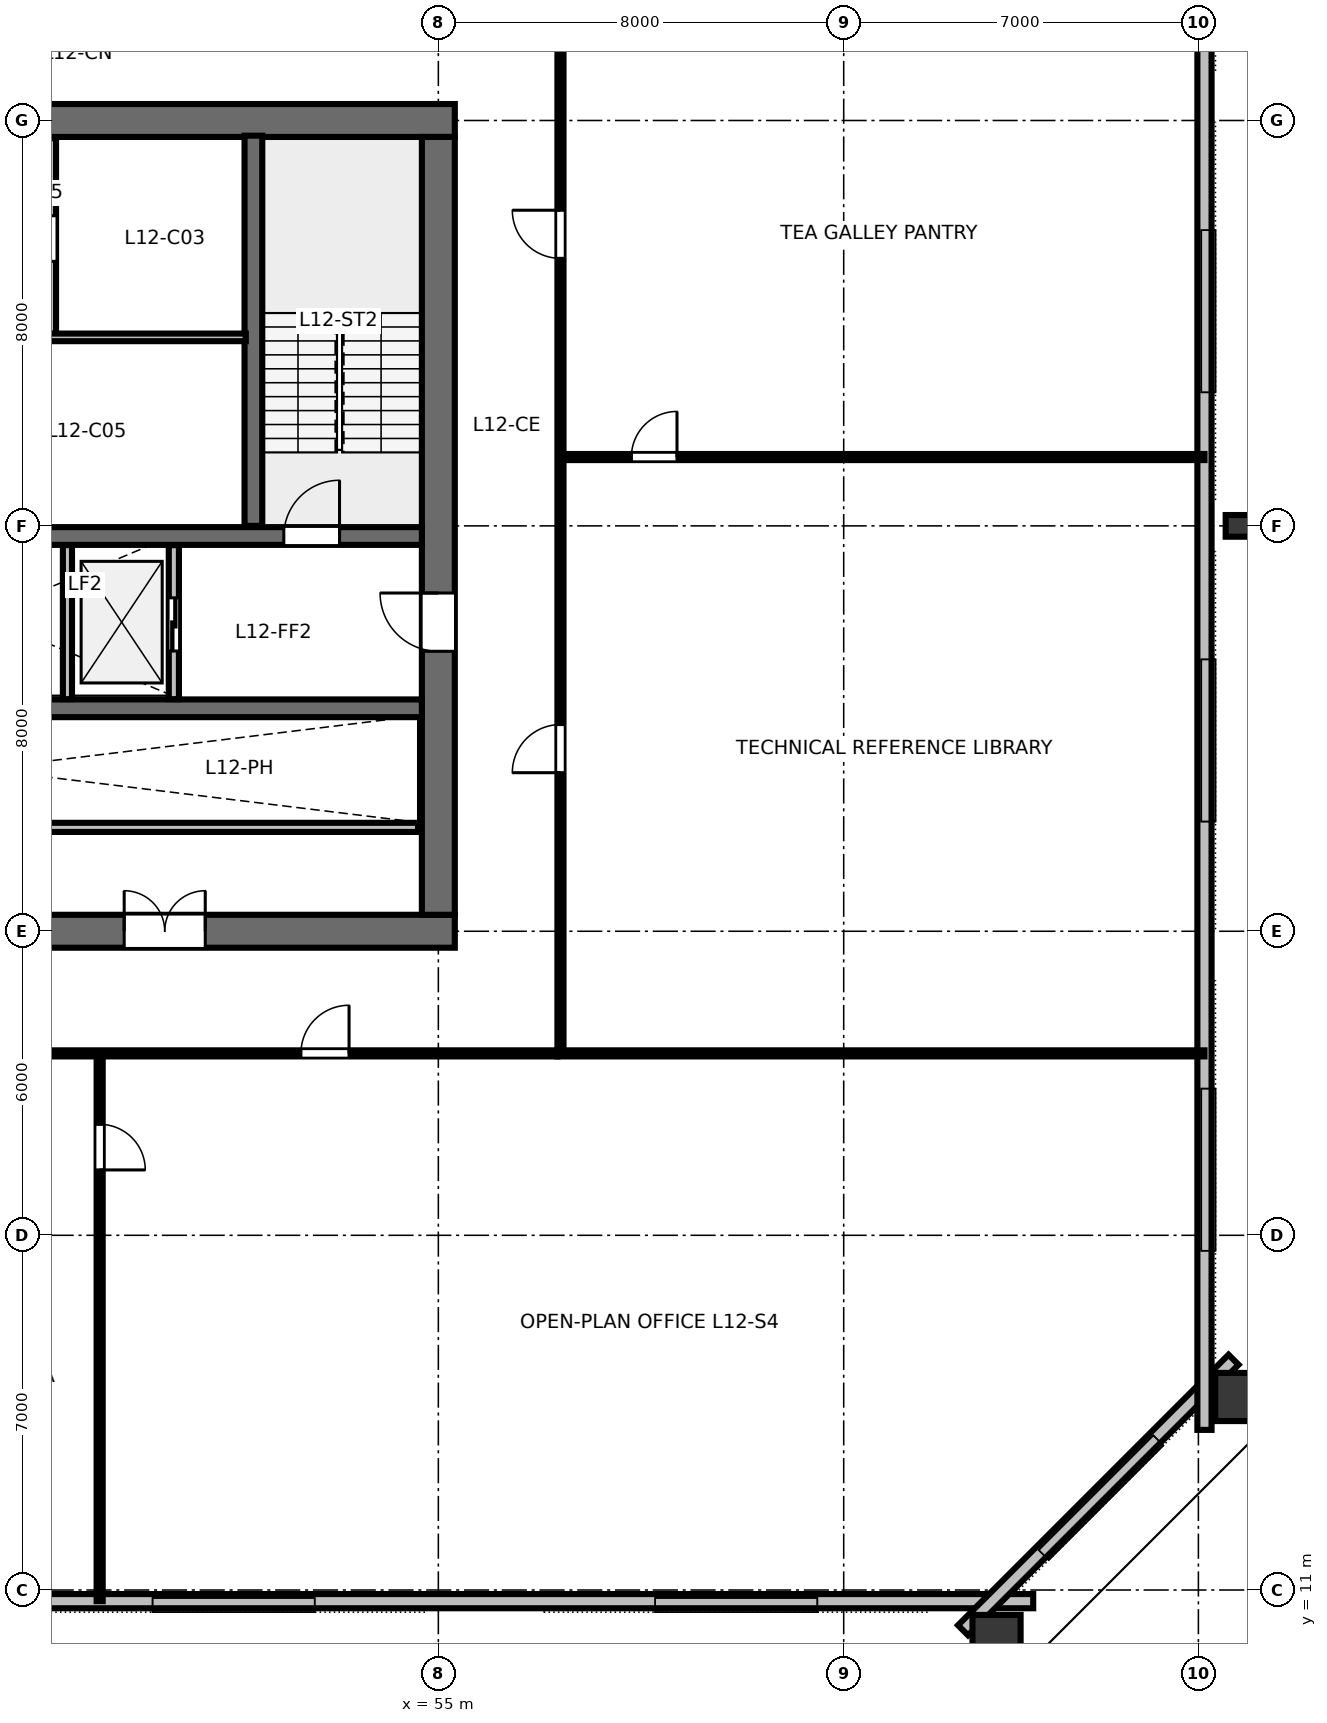
"""IFC4 building model, lengths in metres.
Left out: names, types, materials, properties, quantities, classifications, styles, units other than length and angle.
Written with IfcOpenShell. Run it as: python <this file> out.ifc"""

import sys

from ifc_helpers import new_model, si_unit, direction, frame, frame_2d, origin, origin_2d, place, context, subcontext, project, spatial, rectangle, hollow_rectangle, i_section, extrude, element, fill, save


model = new_model("IFC4")
c1 = context("Model", 3, precision=1e-05, world=origin(), true_north=direction((0.0, 1.0)))
c2 = subcontext(c1, "Body", "Model", "MODEL_VIEW")
j1 = project(units=[si_unit("LENGTHUNIT", "METRE"), si_unit("PLANEANGLEUNIT", "RADIAN")], contexts=[c1])
p1 = place(None, origin())
s1 = spatial("IfcSite", under=j1, at=p1, CompositionType="ELEMENT")
p2 = place(p1, origin())
s2 = spatial("IfcBuilding", under=s1, at=p2, CompositionType="ELEMENT")
p3 = place(p2, frame((0.0, 0.0, 49.6)))
s3 = spatial("IfcBuildingStorey", under=s2, at=p3, CompositionType="ELEMENT", Elevation=49.6)
p4 = place(p3, frame((36.675, 24.0, 0.0), z_axis=(0.0, 0.0, 1.0), x_axis=(1.0, 0.0, 0.0)))
e1 = element("IfcWall", 1, at=p4, inside=s3, PredefinedType="SHEAR", context=c2, shape_type="SweptSolid", body=[
    extrude(rectangle(XDim=18.65, YDim=0.65, at=frame_2d((9.325, 0.0))), origin(), (0.0, 0.0, 1.0), 3.36),
])
p5 = place(p4, frame((5.725, 0.0, 0.0)))
e2 = element("IfcOpeningElement", 2, at=p5, cuts=e1, PredefinedType="OPENING", context=c2, shape_type="SweptSolid", body=[
    extrude(rectangle(XDim=1.6, YDim=2.15, at=frame_2d((0.8, 1.075))), frame((0.0, 0.335, 0.0), z_axis=(0.0, -1.0, 0.0), x_axis=(1.0, 0.0, 0.0)), (0.0, 0.0, 1.0), 0.67),
])
p6 = place(p4, frame((12.125, 0.0, 0.0)))
e3 = element("IfcOpeningElement", 3, at=p6, cuts=e1, PredefinedType="OPENING", context=c2, shape_type="SweptSolid", body=[
    extrude(rectangle(XDim=1.6, YDim=2.15, at=frame_2d((0.8, 1.075))), frame((0.0, 0.335, 0.0), z_axis=(0.0, -1.0, 0.0), x_axis=(1.0, 0.0, 0.0)), (0.0, 0.0, 1.0), 0.67),
])
p7 = place(p3, frame((36.675, 40.0, 0.0), z_axis=(0.0, 0.0, 1.0), x_axis=(1.0, 0.0, 0.0)))
e4 = element("IfcWall", 4, at=p7, inside=s3, PredefinedType="SHEAR", context=c2, shape_type="SweptSolid", body=[
    extrude(rectangle(XDim=18.65, YDim=0.65, at=frame_2d((9.325, 0.0))), origin(), (0.0, 0.0, 1.0), 3.36),
])
p8 = place(p7, frame((8.825, 0.0, 0.0)))
e5 = element("IfcOpeningElement", 5, at=p8, cuts=e4, PredefinedType="OPENING", context=c2, shape_type="SweptSolid", body=[
    extrude(rectangle(XDim=1.0, YDim=2.15, at=frame_2d((0.5, 1.075))), frame((0.0, 0.335, 0.0), z_axis=(0.0, -1.0, 0.0), x_axis=(1.0, 0.0, 0.0)), (0.0, 0.0, 1.0), 0.67),
])
p9 = place(p3, frame((55.0, 24.325, 0.0), z_axis=(0.0, 0.0, 1.0), x_axis=(0.0, 1.0, 0.0)))
e6 = element("IfcWall", 6, at=p9, inside=s3, PredefinedType="SHEAR", context=c2, shape_type="SweptSolid", body=[
    extrude(rectangle(XDim=15.35, YDim=0.65, at=frame_2d((7.675, 0.0))), origin(), (0.0, 0.0, 1.0), 3.36),
])
p10 = place(p9, frame((5.2, 0.0, 0.0)))
e7 = element("IfcOpeningElement", 7, at=p10, cuts=e6, PredefinedType="OPENING", context=c2, shape_type="SweptSolid", body=[
    extrude(rectangle(XDim=1.15, YDim=2.15, at=frame_2d((0.575, 1.075))), frame((0.0, 0.335, 0.0), z_axis=(0.0, -1.0, 0.0), x_axis=(1.0, 0.0, 0.0)), (0.0, 0.0, 1.0), 0.67),
])
p11 = place(p3, frame((37.325, 31.8, 0.0), z_axis=(0.0, 0.0, 1.0), x_axis=(1.0, 0.0, 0.0)))
e8 = element("IfcWall", 8, at=p11, inside=s3, PredefinedType="SHEAR", context=c2, shape_type="SweptSolid", body=[
    extrude(rectangle(XDim=17.35, YDim=0.35, at=frame_2d((8.675, 0.0))), origin(), (0.0, 0.0, 1.0), 3.36),
])
p12 = place(p11, frame((0.725, 0.0, 0.0)))
e9 = element("IfcOpeningElement", 9, at=p12, cuts=e8, PredefinedType="OPENING", context=c2, shape_type="SweptSolid", body=[
    extrude(rectangle(XDim=1.1, YDim=2.15, at=frame_2d((0.55, 1.075))), frame((0.0, 0.185, 0.0), z_axis=(0.0, -1.0, 0.0), x_axis=(1.0, 0.0, 0.0)), (0.0, 0.0, 1.0), 0.37),
])
p13 = place(p11, frame((14.625, 0.0, 0.0)))
e10 = element("IfcOpeningElement", 10, at=p13, cuts=e8, PredefinedType="OPENING", context=c2, shape_type="SweptSolid", body=[
    extrude(rectangle(XDim=1.1, YDim=2.15, at=frame_2d((0.55, 1.075))), frame((0.0, 0.185, 0.0), z_axis=(0.0, -1.0, 0.0), x_axis=(1.0, 0.0, 0.0)), (0.0, 0.0, 1.0), 0.37),
])
p14 = place(p3, frame((37.325, 28.4, 0.0), z_axis=(0.0, 0.0, 1.0), x_axis=(1.0, 0.0, 0.0)))
e11 = element("IfcWall", 11, at=p14, inside=s3, PredefinedType="SHEAR", context=c2, shape_type="SweptSolid", body=[
    extrude(rectangle(XDim=17.35, YDim=0.35, at=frame_2d((8.675, 0.0))), origin(), (0.0, 0.0, 1.0), 3.36),
])
for number, where, z_axis, x_axis in (
    (12, (66.016, 9.933, 0.0), (0.0, 0.0, 1.0), (1.0, 0.0, 0.0)),
    (13, (70.907, 14.809, 0.0), (0.0, 0.0, 1.0), (0.0, 1.0, 0.0)),
):
    element("IfcColumn", number, at=place(p3, frame(where, z_axis=z_axis, x_axis=x_axis)), inside=s3, PredefinedType="COLUMN", context=c2, shape_type="SweptSolid", body=[
        extrude(hollow_rectangle(XDim=0.95, YDim=1.15, WallThickness=0.06, at=origin_2d()), origin(), (0.0, 0.0, 1.0), 3.358),
    ])
p15 = place(p3, frame((70.78, 32.0, 0.0), z_axis=(0.0, 0.0, 1.0), x_axis=(0.0, 1.0, 0.0)))
e14 = element("IfcColumn", 14, at=p15, inside=s3, PredefinedType="COLUMN", context=c2, shape_type="SweptSolid", body=[
    extrude(i_section(OverallWidth=0.428, OverallDepth=0.483, WebThickness=0.051, FlangeThickness=0.082, FilletRadius=0.025, at=origin_2d()), origin(), (0.0, 0.0, 1.0), 3.358),
])
p16 = place(p3, frame((25.26, 10.78, 0.0), z_axis=(0.0, 0.0, 1.0), x_axis=(1.0, 0.0, 0.0)))
e15 = element("IfcWall", 15, at=p16, inside=s3, PredefinedType="STANDARD", context=c2, shape_type="SweptSolid", body=[
    extrude(rectangle(XDim=41.48, YDim=0.28, at=frame_2d((20.74, 0.0))), origin(), (0.0, 0.0, 1.0), 3.36),
])
p17 = place(p3, frame((65.354, 10.206, 0.0), z_axis=(0.0, 0.0, 1.0), x_axis=(0.707106781187, 0.707106781187, 0.0)))
e16 = element("IfcWall", 16, at=p17, inside=s3, PredefinedType="STANDARD", context=c2, shape_type="SweptSolid", body=[
    extrude(rectangle(XDim=7.551, YDim=0.28, at=frame_2d((3.775, 0.0))), origin(), (0.0, 0.0, 1.0), 3.36),
])
p18 = place(p3, frame((70.12, 14.16, 0.0), z_axis=(0.0, 0.0, 1.0), x_axis=(0.0, 1.0, 0.0)))
e17 = element("IfcWall", 17, at=p18, inside=s3, PredefinedType="STANDARD", context=c2, shape_type="SweptSolid", body=[
    extrude(rectangle(XDim=35.68, YDim=0.28, at=frame_2d((17.84, 0.0))), origin(), (0.0, 0.0, 1.0), 3.36),
])
p19 = place(p3, frame((51.35, 32.0, 0.0), z_axis=(0.0, 0.0, 1.0), x_axis=(0.0, 1.0, 0.0)))
e18 = element("IfcWall", 18, at=p19, inside=s3, PredefinedType="SHEAR", context=c2, shape_type="SweptSolid", body=[
    extrude(rectangle(XDim=7.7, YDim=0.35, at=frame_2d((3.85, 0.0))), origin(), (0.0, 0.0, 1.0), 3.6),
])
p20 = place(p3, frame((47.38, 35.72, 0.0), z_axis=(0.0, 0.0, 1.0), x_axis=(0.0, 1.0, 0.0)))
e19 = element("IfcWall", 19, at=p20, inside=s3, PredefinedType="PARTITIONING", context=c2, shape_type="SweptSolid", body=[
    extrude(rectangle(XDim=3.93, YDim=0.15, at=frame_2d((1.965, 0.0))), origin(), (0.0, 0.0, 1.0), 3.36),
])
p21 = place(p20, frame((1.5, 0.0, 0.0)))
e20 = element("IfcOpeningElement", 20, at=p21, cuts=e19, PredefinedType="OPENING", context=c2, shape_type="SweptSolid", body=[
    extrude(rectangle(XDim=0.9, YDim=2.15, at=frame_2d((0.45, 1.075))), frame((0.0, 0.085, 0.0), z_axis=(0.0, -1.0, 0.0), x_axis=(1.0, 0.0, 0.0)), (0.0, 0.0, 1.0), 0.17),
])
p22 = place(p3, frame((40.8, 35.72, 0.0), z_axis=(0.0, 0.0, 1.0), x_axis=(1.0, 0.0, 0.0)))
e21 = element("IfcWall", 21, at=p22, inside=s3, PredefinedType="PARTITIONING", context=c2, shape_type="SweptSolid", body=[
    extrude(rectangle(XDim=10.4, YDim=0.15, at=frame_2d((5.2, 0.0))), origin(), (0.0, 0.0, 1.0), 3.36),
])
p23 = place(p22, frame((4.9, 0.0, 0.0)))
e22 = element("IfcOpeningElement", 22, at=p23, cuts=e21, PredefinedType="OPENING", context=c2, shape_type="SweptSolid", body=[
    extrude(rectangle(XDim=0.9, YDim=2.15, at=frame_2d((0.45, 1.075))), frame((0.0, 0.085, 0.0), z_axis=(0.0, -1.0, 0.0), x_axis=(1.0, 0.0, 0.0)), (0.0, 0.0, 1.0), 0.17),
])
p24 = place(p3, frame((49.78, 28.58, 0.0), z_axis=(0.0, 0.0, 1.0), x_axis=(0.0, 1.0, 0.0)))
e23 = element("IfcWall", 23, at=p24, inside=s3, PredefinedType="PARTITIONING", context=c2, shape_type="SweptSolid", body=[
    extrude(rectangle(XDim=3.04, YDim=0.2, at=frame_2d((1.52, 0.0))), origin(), (0.0, 0.0, 1.0), 3.36),
])
p25 = place(p24, frame((0.95, 0.0, 0.0)))
e24 = element("IfcOpeningElement", 24, at=p25, cuts=e23, PredefinedType="OPENING", context=c2, shape_type="SweptSolid", body=[
    extrude(rectangle(XDim=1.05, YDim=2.15, at=frame_2d((0.525, 1.075))), frame((0.0, 0.11, 0.0), z_axis=(0.0, -1.0, 0.0), x_axis=(1.0, 0.0, 0.0)), (0.0, 0.0, 1.0), 0.22),
])
p26 = place(p3, frame((47.68, 28.58, 0.0), z_axis=(0.0, 0.0, 1.0), x_axis=(0.0, 1.0, 0.0)))
e25 = element("IfcWall", 25, at=p26, inside=s3, PredefinedType="PARTITIONING", context=c2, shape_type="SweptSolid", body=[
    extrude(rectangle(XDim=3.04, YDim=0.18, at=frame_2d((1.52, 0.0))), origin(), (0.0, 0.0, 1.0), 3.36),
])
p27 = place(p3, frame((37.4, 26.05, 0.0), z_axis=(0.0, 0.0, 1.0), x_axis=(1.0, 0.0, 0.0)))
e26 = element("IfcWall", 26, at=p27, inside=s3, PredefinedType="PARTITIONING", context=c2, shape_type="SweptSolid", body=[
    extrude(rectangle(XDim=17.2, YDim=0.18, at=frame_2d((8.6, 0.0))), origin(), (0.0, 0.0, 1.0), 3.36),
])
p28 = place(p27, frame((1.1, 0.0, 0.0)))
e27 = element("IfcOpeningElement", 27, at=p28, cuts=e26, PredefinedType="OPENING", context=c2, shape_type="SweptSolid", body=[
    extrude(rectangle(XDim=1.05, YDim=2.15, at=frame_2d((0.525, 1.075))), frame((0.0, 0.1, 0.0), z_axis=(0.0, -1.0, 0.0), x_axis=(1.0, 0.0, 0.0)), (0.0, 0.0, 1.0), 0.2),
])
p29 = place(p27, frame((3.0, 0.0, 0.0)))
e28 = element("IfcOpeningElement", 28, at=p29, cuts=e26, PredefinedType="OPENING", context=c2, shape_type="SweptSolid", body=[
    extrude(rectangle(XDim=1.05, YDim=2.15, at=frame_2d((0.525, 1.075))), frame((0.0, 0.1, 0.0), z_axis=(0.0, -1.0, 0.0), x_axis=(1.0, 0.0, 0.0)), (0.0, 0.0, 1.0), 0.2),
])
p30 = place(p3, frame((48.316, 21.59, 0.0), z_axis=(0.0, 0.0, 1.0), x_axis=(0.0, -1.0, 0.0)))
e29 = element("IfcWall", 29, at=p30, inside=s3, PredefinedType="PARTITIONING", context=c2, shape_type="SweptSolid", body=[
    extrude(rectangle(XDim=10.81, YDim=0.12, at=frame_2d((5.405, 0.0))), origin(), (0.0, 0.0, 1.0), 2.64),
])
p31 = place(p30, frame((1.4, 0.0, 0.0)))
e30 = element("IfcOpeningElement", 30, at=p31, cuts=e29, PredefinedType="OPENING", context=c2, shape_type="SweptSolid", body=[
    extrude(rectangle(XDim=0.9, YDim=2.15, at=frame_2d((0.45, 1.075))), frame((0.0, 0.07, 0.0), z_axis=(0.0, -1.0, 0.0), x_axis=(1.0, 0.0, 0.0)), (0.0, 0.0, 1.0), 0.14),
])
p32 = place(p3, frame((34.65, 21.59, 0.0), z_axis=(0.0, 0.0, 1.0), x_axis=(1.0, 0.0, 0.0)))
e31 = element("IfcWall", 31, at=p32, inside=s3, PredefinedType="PARTITIONING", context=c2, shape_type="SweptSolid", body=[
    extrude(rectangle(XDim=22.7, YDim=0.12, at=frame_2d((11.35, 0.0))), origin(), (0.0, 0.0, 1.0), 2.64),
])
p33 = place(p32, frame((2.045, 0.0, 0.0)))
e32 = element("IfcOpeningElement", 32, at=p33, cuts=e31, PredefinedType="OPENING", context=c2, shape_type="SweptSolid", body=[
    extrude(rectangle(XDim=0.95, YDim=2.15, at=frame_2d((0.475, 1.075))), frame((0.0, 0.07, 0.0), z_axis=(0.0, -1.0, 0.0), x_axis=(1.0, 0.0, 0.0)), (0.0, 0.0, 1.0), 0.14),
])
p34 = place(p32, frame((7.126, 0.0, 0.0)))
e33 = element("IfcOpeningElement", 33, at=p34, cuts=e31, PredefinedType="OPENING", context=c2, shape_type="SweptSolid", body=[
    extrude(rectangle(XDim=0.95, YDim=2.15, at=frame_2d((0.475, 1.075))), frame((0.0, 0.07, 0.0), z_axis=(0.0, -1.0, 0.0), x_axis=(1.0, 0.0, 0.0)), (0.0, 0.0, 1.0), 0.14),
])
p35 = place(p32, frame((11.509, 0.0, 0.0)))
e34 = element("IfcOpeningElement", 34, at=p35, cuts=e31, PredefinedType="OPENING", context=c2, shape_type="SweptSolid", body=[
    extrude(rectangle(XDim=0.95, YDim=2.15, at=frame_2d((0.475, 1.075))), frame((0.0, 0.07, 0.0), z_axis=(0.0, -1.0, 0.0), x_axis=(1.0, 0.0, 0.0)), (0.0, 0.0, 1.0), 0.14),
])
p36 = place(p32, frame((17.638, 0.0, 0.0)))
e35 = element("IfcOpeningElement", 35, at=p36, cuts=e31, PredefinedType="OPENING", context=c2, shape_type="SweptSolid", body=[
    extrude(rectangle(XDim=0.95, YDim=2.15, at=frame_2d((0.475, 1.075))), frame((0.0, 0.07, 0.0), z_axis=(0.0, -1.0, 0.0), x_axis=(1.0, 0.0, 0.0)), (0.0, 0.0, 1.0), 0.14),
])
p37 = place(p3, frame((57.41, 33.358, 0.0), z_axis=(0.0, 0.0, 1.0), x_axis=(1.0, 0.0, 0.0)))
e36 = element("IfcWall", 36, at=p37, inside=s3, PredefinedType="PARTITIONING", context=c2, shape_type="SweptSolid", body=[
    extrude(rectangle(XDim=12.71, YDim=0.12, at=frame_2d((6.355, 0.0))), origin(), (0.0, 0.0, 1.0), 2.64),
])
p38 = place(p37, frame((1.4, 0.0, 0.0)))
e37 = element("IfcOpeningElement", 37, at=p38, cuts=e36, PredefinedType="OPENING", context=c2, shape_type="SweptSolid", body=[
    extrude(rectangle(XDim=0.9, YDim=2.15, at=frame_2d((0.45, 1.075))), frame((0.0, 0.07, 0.0), z_axis=(0.0, -1.0, 0.0), x_axis=(1.0, 0.0, 0.0)), (0.0, 0.0, 1.0), 0.14),
])
p39 = place(p3, frame((57.41, 21.65, 0.0), z_axis=(0.0, 0.0, 1.0), x_axis=(0.0, 1.0, 0.0)))
e38 = element("IfcWall", 38, at=p39, inside=s3, PredefinedType="PARTITIONING", context=c2, shape_type="SweptSolid", body=[
    extrude(rectangle(XDim=20.7, YDim=0.12, at=frame_2d((10.35, 0.0))), origin(), (0.0, 0.0, 1.0), 2.64),
])
p40 = place(p39, frame((5.479, 0.0, 0.0)))
e39 = element("IfcOpeningElement", 39, at=p40, cuts=e38, PredefinedType="OPENING", context=c2, shape_type="SweptSolid", body=[
    extrude(rectangle(XDim=0.95, YDim=2.15, at=frame_2d((0.475, 1.075))), frame((0.0, 0.07, 0.0), z_axis=(0.0, -1.0, 0.0), x_axis=(1.0, 0.0, 0.0)), (0.0, 0.0, 1.0), 0.14),
])
p41 = place(p39, frame((15.629, 0.0, 0.0)))
e40 = element("IfcOpeningElement", 40, at=p41, cuts=e38, PredefinedType="OPENING", context=c2, shape_type="SweptSolid", body=[
    extrude(rectangle(XDim=0.95, YDim=2.15, at=frame_2d((0.475, 1.075))), frame((0.0, 0.07, 0.0), z_axis=(0.0, -1.0, 0.0), x_axis=(1.0, 0.0, 0.0)), (0.0, 0.0, 1.0), 0.14),
])
p42 = place(p3, frame((57.35, 21.59, 0.0), z_axis=(0.0, 0.0, 1.0), x_axis=(1.0, 0.0, 0.0)))
e41 = element("IfcWall", 41, at=p42, inside=s3, PredefinedType="PARTITIONING", context=c2, shape_type="SweptSolid", body=[
    extrude(rectangle(XDim=12.77, YDim=0.12, at=frame_2d((6.385, 0.0))), origin(), (0.0, 0.0, 1.0), 2.64),
])
p43 = place(p13, origin())
e42 = element("IfcDoor", 42, at=p43, inside=s3, OperationType="SINGLE_SWING_RIGHT", PredefinedType="DOOR", context=c2, shape_type="SweptSolid", body=[
    extrude(rectangle(XDim=1.1, YDim=2.15, at=frame_2d((0.55, 1.075))), frame((0.0, 0.025, 0.0), z_axis=(0.0, -1.0, 0.0), x_axis=(1.0, 0.0, 0.0)), (0.0, 0.0, 1.0), 0.05),
])
fill(e10, e42)
p44 = place(p10, origin())
e43 = element("IfcDoor", 43, at=p44, inside=s3, OperationType="SINGLE_SWING_RIGHT", PredefinedType="DOOR", context=c2, shape_type="SweptSolid", body=[
    extrude(rectangle(XDim=1.15, YDim=2.15, at=frame_2d((0.575, 1.075))), frame((0.0, 0.025, 0.0), z_axis=(0.0, -1.0, 0.0), x_axis=(1.0, 0.0, 0.0)), (0.0, 0.0, 1.0), 0.05),
])
fill(e7, e43)
p45 = place(p6, origin())
e44 = element("IfcDoor", 44, at=p45, inside=s3, OperationType="DOUBLE_DOOR_SINGLE_SWING", PredefinedType="DOOR", context=c2, shape_type="SweptSolid", body=[
    extrude(rectangle(XDim=1.6, YDim=2.15, at=frame_2d((0.8, 1.075))), frame((0.0, 0.025, 0.0), z_axis=(0.0, -1.0, 0.0), x_axis=(1.0, 0.0, 0.0)), (0.0, 0.0, 1.0), 0.05),
])
fill(e3, e44)
p46 = place(p21, origin())
e45 = element("IfcDoor", 45, at=p46, inside=s3, OperationType="SINGLE_SWING_RIGHT", PredefinedType="DOOR", context=c2, shape_type="SweptSolid", body=[
    extrude(rectangle(XDim=0.9, YDim=2.15, at=frame_2d((0.45, 1.075))), frame((0.0, 0.025, 0.0), z_axis=(0.0, -1.0, 0.0), x_axis=(1.0, 0.0, 0.0)), (0.0, 0.0, 1.0), 0.05),
])
fill(e20, e45)
p47 = place(p25, origin())
e46 = element("IfcDoor", 46, at=p47, inside=s3, OperationType="SLIDING_TO_RIGHT", PredefinedType="DOOR", context=c2, shape_type="SweptSolid", body=[
    extrude(rectangle(XDim=1.05, YDim=2.15, at=frame_2d((0.525, 1.075))), frame((0.0, 0.025, 0.0), z_axis=(0.0, -1.0, 0.0), x_axis=(1.0, 0.0, 0.0)), (0.0, 0.0, 1.0), 0.05),
])
fill(e24, e46)
p48 = place(p31, origin())
e47 = element("IfcDoor", 47, at=p48, inside=s3, OperationType="SINGLE_SWING_RIGHT", PredefinedType="DOOR", context=c2, shape_type="SweptSolid", body=[
    extrude(rectangle(XDim=0.9, YDim=2.15, at=frame_2d((0.45, 1.075))), frame((0.0, 0.025, 0.0), z_axis=(0.0, -1.0, 0.0), x_axis=(1.0, 0.0, 0.0)), (0.0, 0.0, 1.0), 0.05),
])
fill(e30, e47)
p49 = place(p36, origin())
e48 = element("IfcDoor", 48, at=p49, inside=s3, OperationType="SINGLE_SWING_RIGHT", PredefinedType="DOOR", context=c2, shape_type="SweptSolid", body=[
    extrude(rectangle(XDim=0.95, YDim=2.15, at=frame_2d((0.475, 1.075))), frame((0.0, 0.025, 0.0), z_axis=(0.0, -1.0, 0.0), x_axis=(1.0, 0.0, 0.0)), (0.0, 0.0, 1.0), 0.05),
])
fill(e35, e48)
p50 = place(p38, origin())
e49 = element("IfcDoor", 49, at=p50, inside=s3, OperationType="SINGLE_SWING_RIGHT", PredefinedType="DOOR", context=c2, shape_type="SweptSolid", body=[
    extrude(rectangle(XDim=0.9, YDim=2.15, at=frame_2d((0.45, 1.075))), frame((0.0, 0.025, 0.0), z_axis=(0.0, -1.0, 0.0), x_axis=(1.0, 0.0, 0.0)), (0.0, 0.0, 1.0), 0.05),
])
fill(e37, e49)
p51 = place(p40, origin())
e50 = element("IfcDoor", 50, at=p51, inside=s3, OperationType="SINGLE_SWING_LEFT", PredefinedType="DOOR", context=c2, shape_type="SweptSolid", body=[
    extrude(rectangle(XDim=0.95, YDim=2.15, at=frame_2d((0.475, 1.075))), frame((0.0, 0.025, 0.0), z_axis=(0.0, -1.0, 0.0), x_axis=(1.0, 0.0, 0.0)), (0.0, 0.0, 1.0), 0.05),
])
fill(e39, e50)
p52 = place(p41, origin())
e51 = element("IfcDoor", 51, at=p52, inside=s3, OperationType="SINGLE_SWING_RIGHT", PredefinedType="DOOR", context=c2, shape_type="SweptSolid", body=[
    extrude(rectangle(XDim=0.95, YDim=2.15, at=frame_2d((0.475, 1.075))), frame((0.0, 0.025, 0.0), z_axis=(0.0, -1.0, 0.0), x_axis=(1.0, 0.0, 0.0)), (0.0, 0.0, 1.0), 0.05),
])
fill(e40, e51)
save(model, sys.argv[1])
